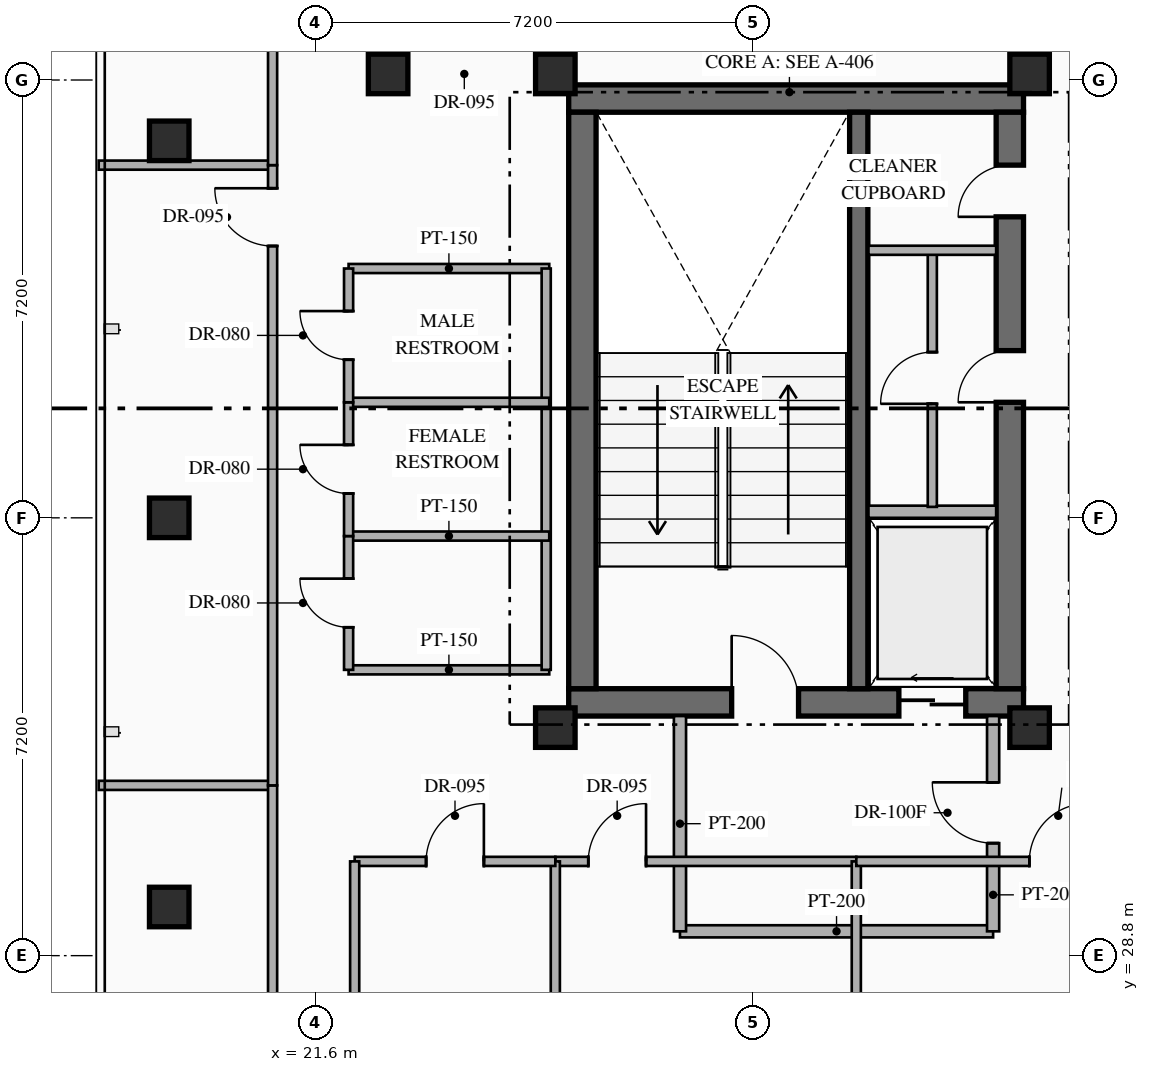
"""IFC4 building model, lengths in metres.
Left out: names, types, materials, properties, quantities, classifications, styles, units other than length and angle.
Written with IfcOpenShell. Run it as: python <this file> out.ifc"""

import sys

from ifc_helpers import new_model, si_unit, direction, frame, frame_2d, origin, origin_2d, place, context, subcontext, project, spatial, rectangle, hollow_rectangle, extrude, element, fill, save


model = new_model("IFC4")
c1 = context("Model", 3, precision=1e-05, world=origin(), true_north=direction((0.0, 1.0)))
c2 = subcontext(c1, "Body", "Model", "MODEL_VIEW")
j1 = project(units=[si_unit("LENGTHUNIT", "METRE"), si_unit("PLANEANGLEUNIT", "RADIAN")], contexts=[c1])
p1 = place(None, origin())
s1 = spatial("IfcSite", under=j1, at=p1, CompositionType="ELEMENT")
p2 = place(p1, origin())
s2 = spatial("IfcBuilding", under=s1, at=p2, CompositionType="ELEMENT")
p3 = place(p2, frame((0.0, 0.0, 243.15)))
s3 = spatial("IfcBuildingStorey", under=s2, at=p3, CompositionType="ELEMENT", Elevation=243.15)
p4 = place(p3, frame((25.77, 32.965, 0.0), z_axis=(0.0, 0.0, 1.0), x_axis=(1.0, 0.0, 0.0)))
e1 = element("IfcWall", 1, at=p4, inside=s3, PredefinedType="SHEAR", context=c2, shape_type="SweptSolid", body=[
    extrude(rectangle(XDim=7.48, YDim=0.45, at=frame_2d((3.74, 0.0))), origin(), (0.0, 0.0, 1.0), 3.6),
])
p5 = place(p4, frame((2.68, 0.0, 0.0)))
e2 = element("IfcOpeningElement", 2, at=p5, cuts=e1, PredefinedType="OPENING", context=c2, shape_type="SweptSolid", body=[
    extrude(rectangle(XDim=1.1, YDim=2.2, at=frame_2d((0.55, 1.1))), frame((0.0, 0.235, 0.0), z_axis=(0.0, -1.0, 0.0), x_axis=(1.0, 0.0, 0.0)), (0.0, 0.0, 1.0), 0.47),
])
p6 = place(p4, frame((5.43, 0.0, 0.0)))
e3 = element("IfcOpeningElement", 3, at=p6, cuts=e1, PredefinedType="OPENING", context=c2, shape_type="SweptSolid", body=[
    extrude(rectangle(XDim=1.1, YDim=2.15, at=frame_2d((0.55, 1.075))), frame((0.0, 0.235, 0.0), z_axis=(0.0, -1.0, 0.0), x_axis=(1.0, 0.0, 0.0)), (0.0, 0.0, 1.0), 0.47),
])
p7 = place(p3, frame((25.77, 42.895, 0.0), z_axis=(0.0, 0.0, 1.0), x_axis=(1.0, 0.0, 0.0)))
e4 = element("IfcWall", 4, at=p7, inside=s3, PredefinedType="SHEAR", context=c2, shape_type="SweptSolid", body=[
    extrude(rectangle(XDim=7.48, YDim=0.45, at=frame_2d((3.74, 0.0))), origin(), (0.0, 0.0, 1.0), 3.6),
])
p8 = place(p3, frame((25.995, 33.19, 0.0), z_axis=(0.0, 0.0, 1.0), x_axis=(0.0, 1.0, 0.0)))
e5 = element("IfcWall", 5, at=p8, inside=s3, PredefinedType="SHEAR", context=c2, shape_type="SweptSolid", body=[
    extrude(rectangle(XDim=9.48, YDim=0.45, at=frame_2d((4.74, 0.0))), origin(), (0.0, 0.0, 1.0), 3.6),
])
p9 = place(p3, frame((33.025, 33.19, 0.0), z_axis=(0.0, 0.0, 1.0), x_axis=(0.0, 1.0, 0.0)))
e6 = element("IfcWall", 6, at=p9, inside=s3, PredefinedType="SHEAR", context=c2, shape_type="SweptSolid", body=[
    extrude(rectangle(XDim=9.48, YDim=0.45, at=frame_2d((4.74, 0.0))), origin(), (0.0, 0.0, 1.0), 3.6),
])
p10 = place(p9, frame((4.71, 0.0, 0.0)))
e7 = element("IfcOpeningElement", 7, at=p10, cuts=e6, PredefinedType="OPENING", context=c2, shape_type="SweptSolid", body=[
    extrude(rectangle(XDim=0.85, YDim=2.08, at=frame_2d((0.425, 1.04))), frame((0.0, 0.235, 0.0), z_axis=(0.0, -1.0, 0.0), x_axis=(1.0, 0.0, 0.0)), (0.0, 0.0, 1.0), 0.47),
])
p11 = place(p9, frame((7.76, 0.0, 0.0)))
e8 = element("IfcOpeningElement", 8, at=p11, cuts=e6, PredefinedType="OPENING", context=c2, shape_type="SweptSolid", body=[
    extrude(rectangle(XDim=0.85, YDim=2.08, at=frame_2d((0.425, 1.04))), frame((0.0, 0.235, 0.0), z_axis=(0.0, -1.0, 0.0), x_axis=(1.0, 0.0, 0.0)), (0.0, 0.0, 1.0), 0.47),
])
p12 = place(p3, frame((30.54, 33.19, 0.0), z_axis=(0.0, 0.0, 1.0), x_axis=(0.0, 1.0, 0.0)))
e9 = element("IfcWall", 9, at=p12, inside=s3, PredefinedType="SHEAR", context=c2, shape_type="SweptSolid", body=[
    extrude(rectangle(XDim=9.48, YDim=0.3, at=frame_2d((4.74, 0.0))), origin(), (0.0, 0.0, 1.0), 3.6),
])
for number, where, z_axis, x_axis in (
    (10, (25.55, 32.55, 0.0), (0.0, 0.0, 1.0), (1.0, 0.0, 0.0)),
    (11, (33.35, 32.55, 0.0), (0.0, 0.0, 1.0), (1.0, 0.0, 0.0)),
    (12, (25.55, 43.3, 0.0), (0.0, 0.0, 1.0), (1.0, 0.0, 0.0)),
    (13, (33.35, 43.3, 0.0), (0.0, 0.0, 1.0), (1.0, 0.0, 0.0)),
    (14, (19.2, 29.6, 0.0), (0.0, 0.0, 1.0), (1.0, 0.0, 0.0)),
    (15, (19.2, 42.2, 0.0), (0.0, 0.0, 1.0), (1.0, 0.0, 0.0)),
    (16, (22.8, 43.3, 0.0), (0.0, 0.0, 1.0), (1.0, 0.0, 0.0)),
    (17, (19.2, 36.0, 0.0), (0.0, 0.0, 1.0), (1.0, 0.0, 0.0)),
):
    element("IfcColumn", number, at=place(p3, frame(where, z_axis=z_axis, x_axis=x_axis)), inside=s3, PredefinedType="COLUMN", context=c2, shape_type="SweptSolid", body=[
        extrude(hollow_rectangle(XDim=0.65, YDim=0.65, WallThickness=0.025, at=origin_2d()), origin(), (0.0, 0.0, 1.0), 3.6),
    ])
p13 = place(p3, frame((30.7, 36.1, 0.0), z_axis=(0.0, 0.0, 1.0), x_axis=(1.0, 0.0, 0.0)))
e18 = element("IfcWall", 18, at=p13, inside=s3, PredefinedType="STANDARD", context=c2, shape_type="SweptSolid", body=[
    extrude(rectangle(XDim=2.1, YDim=0.2, at=frame_2d((1.05, 0.0))), origin(), (0.0, 0.0, 1.0), 3.35),
])
p14 = place(p3, frame((31.75, 36.18, 0.0), z_axis=(0.0, 0.0, 1.0), x_axis=(0.0, 1.0, 0.0)))
e19 = element("IfcWall", 19, at=p14, inside=s3, PredefinedType="PARTITIONING", context=c2, shape_type="SweptSolid", body=[
    extrude(rectangle(XDim=4.24, YDim=0.15, at=frame_2d((2.12, 0.0))), origin(), (0.0, 0.0, 1.0), 3.35),
])
p15 = place(p14, frame((1.695, 0.0, 0.0)))
e20 = element("IfcOpeningElement", 20, at=p15, cuts=e19, PredefinedType="OPENING", context=c2, shape_type="SweptSolid", body=[
    extrude(rectangle(XDim=0.85, YDim=2.08, at=frame_2d((0.425, 1.04))), frame((0.0, 0.085, 0.0), z_axis=(0.0, -1.0, 0.0), x_axis=(1.0, 0.0, 0.0)), (0.0, 0.0, 1.0), 0.17),
])
p16 = place(p3, frame((30.7, 40.4, 0.0), z_axis=(0.0, 0.0, 1.0), x_axis=(1.0, 0.0, 0.0)))
e21 = element("IfcWall", 21, at=p16, inside=s3, PredefinedType="PARTITIONING", context=c2, shape_type="SweptSolid", body=[
    extrude(rectangle(XDim=2.1, YDim=0.15, at=frame_2d((1.05, 0.0))), origin(), (0.0, 0.0, 1.0), 3.35),
])
p17 = place(p3, frame((27.6, 29.2, 0.0), z_axis=(0.0, 0.0, 1.0), x_axis=(1.0, 0.0, 0.0)))
e22 = element("IfcWall", 22, at=p17, inside=s3, PredefinedType="STANDARD", context=c2, shape_type="SweptSolid", body=[
    extrude(rectangle(XDim=5.15, YDim=0.2, at=frame_2d((2.575, 0.0))), origin(), (0.0, 0.0, 1.0), 3.35),
])
p18 = place(p3, frame((27.6, 29.2, 0.0), z_axis=(0.0, 0.0, 1.0), x_axis=(0.0, 1.0, 0.0)))
e23 = element("IfcWall", 23, at=p18, inside=s3, PredefinedType="STANDARD", context=c2, shape_type="SweptSolid", body=[
    extrude(rectangle(XDim=3.54, YDim=0.2, at=frame_2d((1.77, 0.0))), origin(), (0.0, 0.0, 1.0), 3.35),
])
p19 = place(p3, frame((32.75, 29.2, 0.0), z_axis=(0.0, 0.0, 1.0), x_axis=(0.0, 1.0, 0.0)))
e24 = element("IfcWall", 24, at=p19, inside=s3, PredefinedType="STANDARD", context=c2, shape_type="SweptSolid", body=[
    extrude(rectangle(XDim=3.54, YDim=0.2, at=frame_2d((1.77, 0.0))), origin(), (0.0, 0.0, 1.0), 3.35),
])
p20 = place(p19, frame((1.45, 0.0, 0.0)))
e25 = element("IfcOpeningElement", 25, at=p20, cuts=e24, PredefinedType="OPENING", context=c2, shape_type="SweptSolid", body=[
    extrude(rectangle(XDim=1.0, YDim=2.2, at=frame_2d((0.5, 1.1))), frame((0.0, 0.11, 0.0), z_axis=(0.0, -1.0, 0.0), x_axis=(1.0, 0.0, 0.0)), (0.0, 0.0, 1.0), 0.22),
])
for number, where, z_axis, x_axis in (
    (26, (22.15, 33.5, 0.0), (0.0, 0.0, 1.0), (1.0, 0.0, 0.0)),
    (27, (22.15, 40.1, 0.0), (0.0, 0.0, 1.0), (1.0, 0.0, 0.0)),
):
    element("IfcWall", number, at=place(p3, frame(where, z_axis=z_axis, x_axis=x_axis)), inside=s3, PredefinedType="PARTITIONING", context=c2, shape_type="SweptSolid", body=[
        extrude(rectangle(XDim=3.3, YDim=0.15, at=frame_2d((1.65, 0.0))), origin(), (0.0, 0.0, 1.0), 3.35),
    ])
p21 = place(p3, frame((25.4, 33.5, 0.0), z_axis=(0.0, 0.0, 1.0), x_axis=(0.0, 1.0, 0.0)))
e28 = element("IfcWall", 28, at=p21, inside=s3, PredefinedType="PARTITIONING", context=c2, shape_type="SweptSolid", body=[
    extrude(rectangle(XDim=6.6, YDim=0.15, at=frame_2d((3.3, 0.0))), origin(), (0.0, 0.0, 1.0), 3.35),
])
for number, where, z_axis, x_axis in (
    (29, (22.15, 35.7, 0.0), (0.0, 0.0, 1.0), (1.0, 0.0, 0.0)),
    (30, (22.15, 37.9, 0.0), (0.0, 0.0, 1.0), (1.0, 0.0, 0.0)),
):
    element("IfcWall", number, at=place(p3, frame(where, z_axis=z_axis, x_axis=x_axis)), inside=s3, PredefinedType="PARTITIONING", context=c2, shape_type="SweptSolid", body=[
        extrude(rectangle(XDim=3.3, YDim=0.15, at=frame_2d((1.65, 0.0))), origin(), (0.0, 0.0, 1.0), 3.35),
    ])
p22 = place(p3, frame((22.15, 33.5, 0.0), z_axis=(0.0, 0.0, 1.0), x_axis=(0.0, 1.0, 0.0)))
e31 = element("IfcWall", 31, at=p22, inside=s3, PredefinedType="PARTITIONING", context=c2, shape_type="SweptSolid", body=[
    extrude(rectangle(XDim=2.2, YDim=0.15, at=frame_2d((1.1, 0.0))), origin(), (0.0, 0.0, 1.0), 3.35),
])
p23 = place(p22, frame((0.7, 0.0, 0.0)))
e32 = element("IfcOpeningElement", 32, at=p23, cuts=e31, PredefinedType="OPENING", context=c2, shape_type="SweptSolid", body=[
    extrude(rectangle(XDim=0.8, YDim=2.06, at=frame_2d((0.4, 1.03))), frame((0.0, 0.085, 0.0), z_axis=(0.0, -1.0, 0.0), x_axis=(1.0, 0.0, 0.0)), (0.0, 0.0, 1.0), 0.17),
])
p24 = place(p3, frame((22.15, 35.7, 0.0), z_axis=(0.0, 0.0, 1.0), x_axis=(0.0, 1.0, 0.0)))
e33 = element("IfcWall", 33, at=p24, inside=s3, PredefinedType="PARTITIONING", context=c2, shape_type="SweptSolid", body=[
    extrude(rectangle(XDim=2.2, YDim=0.15, at=frame_2d((1.1, 0.0))), origin(), (0.0, 0.0, 1.0), 3.35),
])
p25 = place(p24, frame((0.7, 0.0, 0.0)))
e34 = element("IfcOpeningElement", 34, at=p25, cuts=e33, PredefinedType="OPENING", context=c2, shape_type="SweptSolid", body=[
    extrude(rectangle(XDim=0.8, YDim=2.06, at=frame_2d((0.4, 1.03))), frame((0.0, 0.085, 0.0), z_axis=(0.0, -1.0, 0.0), x_axis=(1.0, 0.0, 0.0)), (0.0, 0.0, 1.0), 0.17),
])
p26 = place(p3, frame((22.15, 37.9, 0.0), z_axis=(0.0, 0.0, 1.0), x_axis=(0.0, 1.0, 0.0)))
e35 = element("IfcWall", 35, at=p26, inside=s3, PredefinedType="PARTITIONING", context=c2, shape_type="SweptSolid", body=[
    extrude(rectangle(XDim=2.2, YDim=0.15, at=frame_2d((1.1, 0.0))), origin(), (0.0, 0.0, 1.0), 3.35),
])
p27 = place(p26, frame((0.7, 0.0, 0.0)))
e36 = element("IfcOpeningElement", 36, at=p27, cuts=e35, PredefinedType="OPENING", context=c2, shape_type="SweptSolid", body=[
    extrude(rectangle(XDim=0.8, YDim=2.06, at=frame_2d((0.4, 1.03))), frame((0.0, 0.085, 0.0), z_axis=(0.0, -1.0, 0.0), x_axis=(1.0, 0.0, 0.0)), (0.0, 0.0, 1.0), 0.17),
])
p28 = place(p3, frame((25.55, 30.35, 0.0), z_axis=(0.0, 0.0, 1.0), x_axis=(1.0, 0.0, 0.0)))
e37 = element("IfcWall", 37, at=p28, inside=s3, PredefinedType="PARTITIONING", context=c2, shape_type="SweptSolid", body=[
    extrude(rectangle(XDim=4.95, YDim=0.15, at=frame_2d((2.475, 0.0))), origin(), (0.0, 0.0, 1.0), 3.35),
])
p29 = place(p28, frame((0.542, 0.0, 0.0)))
e38 = element("IfcOpeningElement", 38, at=p29, cuts=e37, PredefinedType="OPENING", context=c2, shape_type="SweptSolid", body=[
    extrude(rectangle(XDim=0.95, YDim=2.15, at=frame_2d((0.475, 1.075))), frame((0.0, 0.085, 0.0), z_axis=(0.0, -1.0, 0.0), x_axis=(1.0, 0.0, 0.0)), (0.0, 0.0, 1.0), 0.17),
])
p30 = place(p3, frame((25.55, 23.2, 0.0), z_axis=(0.0, 0.0, 1.0), x_axis=(0.0, 1.0, 0.0)))
e39 = element("IfcWall", 39, at=p30, inside=s3, PredefinedType="PARTITIONING", context=c2, shape_type="SweptSolid", body=[
    extrude(rectangle(XDim=7.15, YDim=0.15, at=frame_2d((3.575, 0.0))), origin(), (0.0, 0.0, 1.0), 2.757),
])
p31 = place(p3, frame((30.5, 23.2, 0.0), z_axis=(0.0, 0.0, 1.0), x_axis=(0.0, 1.0, 0.0)))
e40 = element("IfcWall", 40, at=p31, inside=s3, PredefinedType="PARTITIONING", context=c2, shape_type="SweptSolid", body=[
    extrude(rectangle(XDim=7.15, YDim=0.15, at=frame_2d((3.575, 0.0))), origin(), (0.0, 0.0, 1.0), 3.35),
])
p32 = place(p3, frame((30.5, 30.35, 0.0), z_axis=(0.0, 0.0, 1.0), x_axis=(1.0, 0.0, 0.0)))
e41 = element("IfcWall", 41, at=p32, inside=s3, PredefinedType="PARTITIONING", context=c2, shape_type="SweptSolid", body=[
    extrude(rectangle(XDim=4.45, YDim=0.15, at=frame_2d((2.225, 0.0))), origin(), (0.0, 0.0, 1.0), 3.35),
])
p33 = place(p32, frame((2.846, 0.0, 0.0)))
e42 = element("IfcOpeningElement", 42, at=p33, cuts=e41, PredefinedType="OPENING", context=c2, shape_type="SweptSolid", body=[
    extrude(rectangle(XDim=0.95, YDim=2.15, at=frame_2d((0.475, 1.075))), frame((0.0, 0.085, 0.0), z_axis=(0.0, -1.0, 0.0), x_axis=(1.0, 0.0, 0.0)), (0.0, 0.0, 1.0), 0.17),
])
p34 = place(p3, frame((18.04, 31.6, 0.0), z_axis=(0.0, 0.0, 1.0), x_axis=(1.0, 0.0, 0.0)))
e43 = element("IfcWall", 43, at=p34, inside=s3, PredefinedType="PARTITIONING", context=c2, shape_type="SweptSolid", body=[
    extrude(rectangle(XDim=2.86, YDim=0.15, at=frame_2d((1.43, 0.0))), origin(), (0.0, 0.0, 1.0), 3.35),
])
p35 = place(p3, frame((20.9, 23.44, 0.0), z_axis=(0.0, 0.0, 1.0), x_axis=(0.0, 1.0, 0.0)))
e44 = element("IfcWall", 44, at=p35, inside=s3, PredefinedType="PARTITIONING", context=c2, shape_type="SweptSolid", body=[
    extrude(rectangle(XDim=8.16, YDim=0.15, at=frame_2d((4.08, 0.0))), origin(), (0.0, 0.0, 1.0), 3.35),
])
p36 = place(p35, frame((3.605, 0.0, 0.0)))
e45 = element("IfcOpeningElement", 45, at=p36, cuts=e44, PredefinedType="OPENING", context=c2, shape_type="SweptSolid", body=[
    extrude(rectangle(XDim=0.95, YDim=2.15, at=frame_2d((0.475, 1.075))), frame((0.0, 0.085, 0.0), z_axis=(0.0, -1.0, 0.0), x_axis=(1.0, 0.0, 0.0)), (0.0, 0.0, 1.0), 0.17),
])
p37 = place(p3, frame((18.04, 41.8, 0.0), z_axis=(0.0, 0.0, 1.0), x_axis=(1.0, 0.0, 0.0)))
e46 = element("IfcWall", 46, at=p37, inside=s3, PredefinedType="PARTITIONING", context=c2, shape_type="SweptSolid", body=[
    extrude(rectangle(XDim=2.86, YDim=0.15, at=frame_2d((1.43, 0.0))), origin(), (0.0, 0.0, 1.0), 3.35),
])
p38 = place(p3, frame((20.9, 31.6, 0.0), z_axis=(0.0, 0.0, 1.0), x_axis=(0.0, 1.0, 0.0)))
e47 = element("IfcWall", 47, at=p38, inside=s3, PredefinedType="PARTITIONING", context=c2, shape_type="SweptSolid", body=[
    extrude(rectangle(XDim=10.2, YDim=0.15, at=frame_2d((5.1, 0.0))), origin(), (0.0, 0.0, 1.0), 3.35),
])
p39 = place(p38, frame((8.87, 0.0, 0.0)))
e48 = element("IfcOpeningElement", 48, at=p39, cuts=e47, PredefinedType="OPENING", context=c2, shape_type="SweptSolid", body=[
    extrude(rectangle(XDim=0.95, YDim=2.15, at=frame_2d((0.475, 1.075))), frame((0.0, 0.085, 0.0), z_axis=(0.0, -1.0, 0.0), x_axis=(1.0, 0.0, 0.0)), (0.0, 0.0, 1.0), 0.17),
])
p40 = place(p3, frame((20.9, 41.8, 0.0), z_axis=(0.0, 0.0, 1.0), x_axis=(0.0, 1.0, 0.0)))
e49 = element("IfcWall", 49, at=p40, inside=s3, PredefinedType="PARTITIONING", context=c2, shape_type="SweptSolid", body=[
    extrude(rectangle(XDim=8.56, YDim=0.15, at=frame_2d((4.28, 0.0))), origin(), (0.0, 0.0, 1.0), 3.35),
])
p41 = place(p40, frame((3.805, 0.0, 0.0)))
e50 = element("IfcOpeningElement", 50, at=p41, cuts=e49, PredefinedType="OPENING", context=c2, shape_type="SweptSolid", body=[
    extrude(rectangle(XDim=0.95, YDim=2.15, at=frame_2d((0.475, 1.075))), frame((0.0, 0.085, 0.0), z_axis=(0.0, -1.0, 0.0), x_axis=(1.0, 0.0, 0.0)), (0.0, 0.0, 1.0), 0.17),
])
p42 = place(p3, frame((22.25, 30.35, 0.0), z_axis=(0.0, 0.0, 1.0), x_axis=(1.0, 0.0, 0.0)))
e51 = element("IfcWall", 51, at=p42, inside=s3, PredefinedType="PARTITIONING", context=c2, shape_type="SweptSolid", body=[
    extrude(rectangle(XDim=3.3, YDim=0.15, at=frame_2d((1.65, 0.0))), origin(), (0.0, 0.0, 1.0), 3.35),
])
p43 = place(p42, frame((1.175, 0.0, 0.0)))
e52 = element("IfcOpeningElement", 52, at=p43, cuts=e51, PredefinedType="OPENING", context=c2, shape_type="SweptSolid", body=[
    extrude(rectangle(XDim=0.95, YDim=2.15, at=frame_2d((0.475, 1.075))), frame((0.0, 0.085, 0.0), z_axis=(0.0, -1.0, 0.0), x_axis=(1.0, 0.0, 0.0)), (0.0, 0.0, 1.0), 0.17),
])
p44 = place(p3, frame((22.25, 23.44, 0.0), z_axis=(0.0, 0.0, 1.0), x_axis=(0.0, 1.0, 0.0)))
e53 = element("IfcWall", 53, at=p44, inside=s3, PredefinedType="PARTITIONING", context=c2, shape_type="SweptSolid", body=[
    extrude(rectangle(XDim=6.91, YDim=0.15, at=frame_2d((3.455, 0.0))), origin(), (0.0, 0.0, 1.0), 3.35),
])
p45 = place(p5, origin())
e54 = element("IfcDoor", 54, at=p45, inside=s3, OperationType="SINGLE_SWING_LEFT", PredefinedType="DOOR", context=c2, shape_type="SweptSolid", body=[
    extrude(rectangle(XDim=1.1, YDim=2.2, at=frame_2d((0.55, 1.1))), frame((0.0, 0.025, 0.0), z_axis=(0.0, -1.0, 0.0), x_axis=(1.0, 0.0, 0.0)), (0.0, 0.0, 1.0), 0.05),
])
fill(e2, e54)
p46 = place(p6, origin())
e55 = element("IfcDoor", 55, at=p46, inside=s3, OperationType="SLIDING_TO_LEFT", PredefinedType="USERDEFINED", context=c2, shape_type="SweptSolid", body=[
    extrude(rectangle(XDim=1.1, YDim=2.15, at=frame_2d((0.55, 1.075))), frame((0.0, 0.025, 0.0), z_axis=(0.0, -1.0, 0.0), x_axis=(1.0, 0.0, 0.0)), (0.0, 0.0, 1.0), 0.05),
])
fill(e3, e55)
p47 = place(p10, origin())
e56 = element("IfcDoor", 56, at=p47, inside=s3, OperationType="SINGLE_SWING_LEFT", PredefinedType="DOOR", context=c2, shape_type="SweptSolid", body=[
    extrude(rectangle(XDim=0.85, YDim=2.08, at=frame_2d((0.425, 1.04))), frame((0.0, 0.025, 0.0), z_axis=(0.0, -1.0, 0.0), x_axis=(1.0, 0.0, 0.0)), (0.0, 0.0, 1.0), 0.05),
])
fill(e7, e56)
p48 = place(p11, origin())
e57 = element("IfcDoor", 57, at=p48, inside=s3, OperationType="SINGLE_SWING_LEFT", PredefinedType="DOOR", context=c2, shape_type="SweptSolid", body=[
    extrude(rectangle(XDim=0.85, YDim=2.08, at=frame_2d((0.425, 1.04))), frame((0.0, 0.025, 0.0), z_axis=(0.0, -1.0, 0.0), x_axis=(1.0, 0.0, 0.0)), (0.0, 0.0, 1.0), 0.05),
])
fill(e8, e57)
p49 = place(p15, origin())
e58 = element("IfcDoor", 58, at=p49, inside=s3, OperationType="SINGLE_SWING_LEFT", PredefinedType="DOOR", context=c2, shape_type="SweptSolid", body=[
    extrude(rectangle(XDim=0.85, YDim=2.08, at=frame_2d((0.425, 1.04))), frame((0.0, 0.025, 0.0), z_axis=(0.0, -1.0, 0.0), x_axis=(1.0, 0.0, 0.0)), (0.0, 0.0, 1.0), 0.05),
])
fill(e20, e58)
p50 = place(p20, origin())
e59 = element("IfcDoor", 59, at=p50, inside=s3, OperationType="SINGLE_SWING_RIGHT", PredefinedType="DOOR", context=c2, shape_type="SweptSolid", body=[
    extrude(rectangle(XDim=1.0, YDim=2.2, at=frame_2d((0.5, 1.1))), frame((0.0, 0.025, 0.0), z_axis=(0.0, -1.0, 0.0), x_axis=(1.0, 0.0, 0.0)), (0.0, 0.0, 1.0), 0.05),
])
fill(e25, e59)
p51 = place(p23, origin())
e60 = element("IfcDoor", 60, at=p51, inside=s3, OperationType="SINGLE_SWING_RIGHT", PredefinedType="DOOR", context=c2, shape_type="SweptSolid", body=[
    extrude(rectangle(XDim=0.8, YDim=2.06, at=frame_2d((0.4, 1.03))), frame((0.0, 0.025, 0.0), z_axis=(0.0, -1.0, 0.0), x_axis=(1.0, 0.0, 0.0)), (0.0, 0.0, 1.0), 0.05),
])
fill(e32, e60)
p52 = place(p25, origin())
e61 = element("IfcDoor", 61, at=p52, inside=s3, OperationType="SINGLE_SWING_RIGHT", PredefinedType="DOOR", context=c2, shape_type="SweptSolid", body=[
    extrude(rectangle(XDim=0.8, YDim=2.06, at=frame_2d((0.4, 1.03))), frame((0.0, 0.025, 0.0), z_axis=(0.0, -1.0, 0.0), x_axis=(1.0, 0.0, 0.0)), (0.0, 0.0, 1.0), 0.05),
])
fill(e34, e61)
p53 = place(p27, origin())
e62 = element("IfcDoor", 62, at=p53, inside=s3, OperationType="SINGLE_SWING_RIGHT", PredefinedType="DOOR", context=c2, shape_type="SweptSolid", body=[
    extrude(rectangle(XDim=0.8, YDim=2.06, at=frame_2d((0.4, 1.03))), frame((0.0, 0.025, 0.0), z_axis=(0.0, -1.0, 0.0), x_axis=(1.0, 0.0, 0.0)), (0.0, 0.0, 1.0), 0.05),
])
fill(e36, e62)
p54 = place(p29, origin())
e63 = element("IfcDoor", 63, at=p54, inside=s3, OperationType="SINGLE_SWING_RIGHT", PredefinedType="DOOR", context=c2, shape_type="SweptSolid", body=[
    extrude(rectangle(XDim=0.95, YDim=2.15, at=frame_2d((0.475, 1.075))), frame((0.0, 0.025, 0.0), z_axis=(0.0, -1.0, 0.0), x_axis=(1.0, 0.0, 0.0)), (0.0, 0.0, 1.0), 0.05),
])
fill(e38, e63)
p55 = place(p33, origin())
e64 = element("IfcDoor", 64, at=p55, inside=s3, OperationType="SINGLE_SWING_RIGHT", PredefinedType="DOOR", context=c2, shape_type="SweptSolid", body=[
    extrude(rectangle(XDim=0.95, YDim=2.15, at=frame_2d((0.475, 1.075))), frame((0.0, 0.025, 0.0), z_axis=(0.0, -1.0, 0.0), x_axis=(1.0, 0.0, 0.0)), (0.0, 0.0, 1.0), 0.05),
])
fill(e42, e64)
p56 = place(p39, origin())
e65 = element("IfcDoor", 65, at=p56, inside=s3, OperationType="SINGLE_SWING_RIGHT", PredefinedType="DOOR", context=c2, shape_type="SweptSolid", body=[
    extrude(rectangle(XDim=0.95, YDim=2.15, at=frame_2d((0.475, 1.075))), frame((0.0, 0.025, 0.0), z_axis=(0.0, -1.0, 0.0), x_axis=(1.0, 0.0, 0.0)), (0.0, 0.0, 1.0), 0.05),
])
fill(e48, e65)
p57 = place(p43, origin())
e66 = element("IfcDoor", 66, at=p57, inside=s3, OperationType="SINGLE_SWING_RIGHT", PredefinedType="DOOR", context=c2, shape_type="SweptSolid", body=[
    extrude(rectangle(XDim=0.95, YDim=2.15, at=frame_2d((0.475, 1.075))), frame((0.0, 0.025, 0.0), z_axis=(0.0, -1.0, 0.0), x_axis=(1.0, 0.0, 0.0)), (0.0, 0.0, 1.0), 0.05),
])
fill(e52, e66)
save(model, sys.argv[1])
